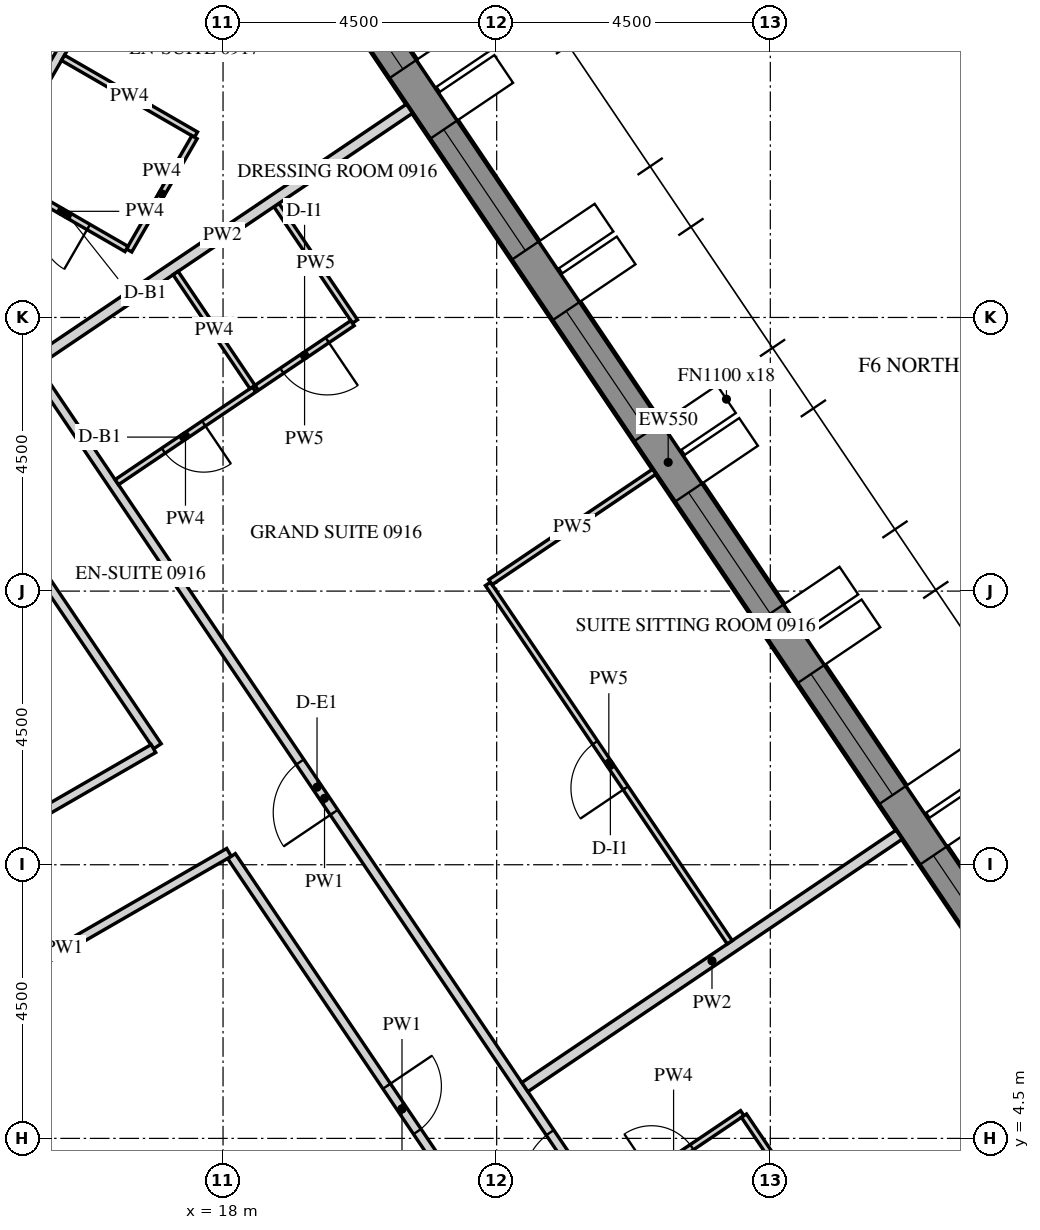
"""IFC4 building model, lengths in metres.
Left out: names, types, materials, properties, quantities, classifications, styles, units other than length and angle.
Written with IfcOpenShell. Run it as: python <this file> out.ifc"""

import sys

from ifc_helpers import new_model, si_unit, direction, frame, frame_2d, origin, place, context, subcontext, project, spatial, polyline, rectangle, outline, extrude, element, fill, save


model = new_model("IFC4")
c1 = context("Model", 3, precision=1e-05, world=origin(), true_north=direction((0.0, 1.0)))
c2 = subcontext(c1, "Body", "Model", "MODEL_VIEW")
j1 = project(units=[si_unit("LENGTHUNIT", "METRE"), si_unit("PLANEANGLEUNIT", "RADIAN")], contexts=[c1])
p1 = place(None, origin())
s1 = spatial("IfcSite", under=j1, at=p1, CompositionType="ELEMENT")
p2 = place(p1, origin())
s2 = spatial("IfcBuilding", under=s1, at=p2, CompositionType="ELEMENT")
p3 = place(p2, frame((0.0, 0.0, 123.3)))
s3 = spatial("IfcBuildingStorey", under=s2, at=p3, CompositionType="ELEMENT", Elevation=123.3)
p4 = place(p3, frame((33.728, 3.153, -0.15), z_axis=(0.0, 0.0, 1.0), x_axis=(-0.559192411416, 0.82903790445, 0.0)))
e1 = element("IfcWall", 1, at=p4, inside=s3, PredefinedType="SOLIDWALL", context=c2, shape_type="SweptSolid", body=[
    extrude(outline(polyline([(-0.026, -0.275), (30.093, -0.275), (30.048, 0.275), (0.026, 0.275), (-0.026, -0.275)])), origin(), (0.0, 0.0, 1.0), 3.9),
])
p5 = place(p4, frame((1.236, 0.0, 1.05)))
e2 = element("IfcOpeningElement", 2, at=p5, cuts=e1, PredefinedType="OPENING", context=c2, shape_type="SweptSolid", body=[
    extrude(rectangle(XDim=2.4, YDim=2.4, at=frame_2d((1.2, 1.2))), frame((0.0, 0.285, 0.0), z_axis=(0.0, -1.0, 0.0), x_axis=(1.0, 0.0, 0.0)), (0.0, 0.0, 1.0), 0.57),
])
p6 = place(p4, frame((4.835, 0.0, 1.05)))
e3 = element("IfcOpeningElement", 3, at=p6, cuts=e1, PredefinedType="OPENING", context=c2, shape_type="SweptSolid", body=[
    extrude(rectangle(XDim=2.4, YDim=2.4, at=frame_2d((1.2, 1.2))), frame((0.0, 0.285, 0.0), z_axis=(0.0, -1.0, 0.0), x_axis=(1.0, 0.0, 0.0)), (0.0, 0.0, 1.0), 0.57),
])
p7 = place(p4, frame((8.436, 0.0, 1.05)))
e4 = element("IfcOpeningElement", 4, at=p7, cuts=e1, PredefinedType="OPENING", context=c2, shape_type="SweptSolid", body=[
    extrude(rectangle(XDim=2.4, YDim=2.4, at=frame_2d((1.2, 1.2))), frame((0.0, 0.285, 0.0), z_axis=(0.0, -1.0, 0.0), x_axis=(1.0, 0.0, 0.0)), (0.0, 0.0, 1.0), 0.57),
])
p8 = place(p4, frame((12.035, 0.0, 1.05)))
e5 = element("IfcOpeningElement", 5, at=p8, cuts=e1, PredefinedType="OPENING", context=c2, shape_type="SweptSolid", body=[
    extrude(rectangle(XDim=2.4, YDim=2.4, at=frame_2d((1.2, 1.2))), frame((0.0, 0.285, 0.0), z_axis=(0.0, -1.0, 0.0), x_axis=(1.0, 0.0, 0.0)), (0.0, 0.0, 1.0), 0.57),
])
p9 = place(p4, frame((15.635, 0.0, 1.05)))
e6 = element("IfcOpeningElement", 6, at=p9, cuts=e1, PredefinedType="OPENING", context=c2, shape_type="SweptSolid", body=[
    extrude(rectangle(XDim=2.4, YDim=2.4, at=frame_2d((1.2, 1.2))), frame((0.0, 0.285, 0.0), z_axis=(0.0, -1.0, 0.0), x_axis=(1.0, 0.0, 0.0)), (0.0, 0.0, 1.0), 0.57),
])
p10 = place(p4, frame((19.236, 0.0, 1.05)))
e7 = element("IfcOpeningElement", 7, at=p10, cuts=e1, PredefinedType="OPENING", context=c2, shape_type="SweptSolid", body=[
    extrude(rectangle(XDim=2.4, YDim=2.4, at=frame_2d((1.2, 1.2))), frame((0.0, 0.285, 0.0), z_axis=(0.0, -1.0, 0.0), x_axis=(1.0, 0.0, 0.0)), (0.0, 0.0, 1.0), 0.57),
])
p11 = place(p4, frame((22.835, 0.0, 1.05)))
e8 = element("IfcOpeningElement", 8, at=p11, cuts=e1, PredefinedType="OPENING", context=c2, shape_type="SweptSolid", body=[
    extrude(rectangle(XDim=2.4, YDim=2.4, at=frame_2d((1.2, 1.2))), frame((0.0, 0.285, 0.0), z_axis=(0.0, -1.0, 0.0), x_axis=(1.0, 0.0, 0.0)), (0.0, 0.0, 1.0), 0.57),
])
p12 = place(p4, frame((26.436, 0.0, 1.05)))
e9 = element("IfcOpeningElement", 9, at=p12, cuts=e1, PredefinedType="OPENING", context=c2, shape_type="SweptSolid", body=[
    extrude(rectangle(XDim=2.4, YDim=2.4, at=frame_2d((1.2, 1.2))), frame((0.0, 0.285, 0.0), z_axis=(0.0, -1.0, 0.0), x_axis=(1.0, 0.0, 0.0)), (0.0, 0.0, 1.0), 0.57),
])
p13 = place(p3, frame((15.819, 0.0, -0.15), z_axis=(0.0, 0.0, 1.0), x_axis=(-0.499999880136, 0.866025472988, 0.0)))
e10 = element("IfcWall", 10, at=p13, inside=s3, PredefinedType="SHEAR", context=c2, shape_type="SweptSolid", body=[
    extrude(outline(polyline([(-0.173, -0.3), (15.993, -0.3), (15.646, 0.3), (0.173, 0.3), (-0.173, -0.3)])), origin(), (0.0, 0.0, 1.0), 3.9),
])
p14 = place(p13, frame((6.981, 0.0, 0.15)))
e11 = element("IfcOpeningElement", 11, at=p14, cuts=e10, PredefinedType="OPENING", context=c2, shape_type="SweptSolid", body=[
    extrude(rectangle(XDim=1.8, YDim=2.4, at=frame_2d((0.9, 1.2))), frame((0.0, 0.31, 0.0), z_axis=(0.0, -1.0, 0.0), x_axis=(1.0, 0.0, 0.0)), (0.0, 0.0, 1.0), 0.62),
])
p15 = place(p3, frame((8.083, 14.0, -0.15), z_axis=(0.0, 0.0, 1.0), x_axis=(0.499997680643, 0.866026742862, 0.0)))
e12 = element("IfcWall", 12, at=p15, inside=s3, PredefinedType="SHEAR", context=c2, shape_type="SweptSolid", body=[
    extrude(rectangle(XDim=16.509, YDim=0.6, at=frame_2d((8.254, 0.0))), origin(), (0.0, 0.0, 1.0), 3.9),
])
p16 = place(p15, frame((7.354, 0.0, 0.15)))
e13 = element("IfcOpeningElement", 13, at=p16, cuts=e12, PredefinedType="OPENING", context=c2, shape_type="SweptSolid", body=[
    extrude(rectangle(XDim=1.8, YDim=2.4, at=frame_2d((0.9, 1.2))), frame((0.0, 0.31, 0.0), z_axis=(0.0, -1.0, 0.0), x_axis=(1.0, 0.0, 0.0)), (0.0, 0.0, 1.0), 0.62),
])
p17 = place(p3, frame((25.821, 0.972, 0.0), z_axis=(0.0, 0.0, 1.0), x_axis=(-0.559193816298, 0.829036956845, 0.0)))
e14 = element("IfcWall", 14, at=p17, inside=s3, PredefinedType="PARTITIONING", context=c2, shape_type="SweptSolid", body=[
    extrude(rectangle(XDim=22.002, YDim=0.15, at=frame_2d((11.001, 0.0))), origin(), (0.0, 0.0, 1.0), 2.988),
])
p18 = place(p17, frame((3.369, 0.0, 0.0)))
e15 = element("IfcOpeningElement", 15, at=p18, cuts=e14, PredefinedType="OPENING", context=c2, shape_type="SweptSolid", body=[
    extrude(rectangle(XDim=1.0, YDim=2.1, at=frame_2d((0.5, 1.05))), frame((0.0, 0.085, 0.0), z_axis=(0.0, -1.0, 0.0), x_axis=(1.0, 0.0, 0.0)), (0.0, 0.0, 1.0), 0.17),
])
p19 = place(p17, frame((10.721, 0.0, 0.0)))
e16 = element("IfcOpeningElement", 16, at=p19, cuts=e14, PredefinedType="OPENING", context=c2, shape_type="SweptSolid", body=[
    extrude(rectangle(XDim=1.0, YDim=2.1, at=frame_2d((0.5, 1.05))), frame((0.0, 0.085, 0.0), z_axis=(0.0, -1.0, 0.0), x_axis=(1.0, 0.0, 0.0)), (0.0, 0.0, 1.0), 0.17),
])
p20 = place(p17, frame((20.852, 0.0, 0.0)))
e17 = element("IfcOpeningElement", 17, at=p20, cuts=e14, PredefinedType="OPENING", context=c2, shape_type="SweptSolid", body=[
    extrude(rectangle(XDim=1.0, YDim=2.1, at=frame_2d((0.5, 1.05))), frame((0.0, 0.085, 0.0), z_axis=(0.0, -1.0, 0.0), x_axis=(1.0, 0.0, 0.0)), (0.0, 0.0, 1.0), 0.17),
])
p21 = place(p3, frame((13.559, 19.285, 0.0), z_axis=(0.0, 0.0, 1.0), x_axis=(0.499975646431, 0.866039463868, 0.0)))
e18 = element("IfcWall", 18, at=p21, inside=s3, PredefinedType="PARTITIONING", context=c2, shape_type="SweptSolid", body=[
    extrude(rectangle(XDim=3.84, YDim=0.15, at=frame_2d((1.92, 0.0))), origin(), (0.0, 0.0, 1.0), 2.988),
])
p22 = place(p3, frame((12.664, 6.066, 0.0), z_axis=(0.0, 0.0, 1.0), x_axis=(0.866036561919, 0.499980673046, 0.0)))
e19 = element("IfcWall", 19, at=p22, inside=s3, PredefinedType="PARTITIONING", context=c2, shape_type="SweptSolid", body=[
    extrude(rectangle(XDim=6.275, YDim=0.15, at=frame_2d((3.137, 0.0))), origin(), (0.0, 0.0, 1.0), 2.988),
])
p23 = place(p3, frame((18.14, 9.141, 0.0), z_axis=(0.0, 0.0, 1.0), x_axis=(0.55918799196, -0.829040885389, 0.0)))
e20 = element("IfcWall", 20, at=p23, inside=s3, PredefinedType="PARTITIONING", context=c2, shape_type="SweptSolid", body=[
    extrude(rectangle(XDim=10.025, YDim=0.15, at=frame_2d((5.013, 0.0))), origin(), (0.0, 0.0, 1.0), 2.988),
])
p24 = place(p23, frame((4.563, 0.0, 0.0)))
e21 = element("IfcOpeningElement", 21, at=p24, cuts=e20, PredefinedType="OPENING", context=c2, shape_type="SweptSolid", body=[
    extrude(rectangle(XDim=0.9, YDim=2.1, at=frame_2d((0.45, 1.05))), frame((0.0, 0.085, 0.0), z_axis=(0.0, -1.0, 0.0), x_axis=(1.0, 0.0, 0.0)), (0.0, 0.0, 1.0), 0.17),
])
p25 = place(p3, frame((11.465, 19.037, 0.0), z_axis=(0.0, 0.0, 1.0), x_axis=(0.559196064773, -0.829035440221, 0.0)))
e22 = element("IfcWall", 22, at=p25, inside=s3, PredefinedType="PARTITIONING", context=c2, shape_type="SweptSolid", body=[
    extrude(rectangle(XDim=9.757, YDim=0.15, at=frame_2d((4.878, 0.0))), origin(), (0.0, 0.0, 1.0), 2.988),
])
p26 = place(p25, frame((4.428, 0.0, 0.0)))
e23 = element("IfcOpeningElement", 23, at=p26, cuts=e22, PredefinedType="OPENING", context=c2, shape_type="SweptSolid", body=[
    extrude(rectangle(XDim=0.9, YDim=2.1, at=frame_2d((0.45, 1.05))), frame((0.0, 0.085, 0.0), z_axis=(0.0, -1.0, 0.0), x_axis=(1.0, 0.0, 0.0)), (0.0, 0.0, 1.0), 0.17),
])
p27 = place(p3, frame((16.855, 10.911, 0.0), z_axis=(0.0, 0.0, 1.0), x_axis=(-0.866020343444, -0.500008764664, 0.0)))
e24 = element("IfcWall", 24, at=p27, inside=s3, PredefinedType="PARTITIONING", context=c2, shape_type="SweptSolid", body=[
    extrude(rectangle(XDim=6.053, YDim=0.15, at=frame_2d((3.026, 0.0))), origin(), (0.0, 0.0, 1.0), 2.988),
])
p28 = place(p3, frame((24.28, 3.391, 0.0), z_axis=(0.0, 0.0, 1.0), x_axis=(0.829005477618, 0.559240483226, 0.0)))
e25 = element("IfcWall", 25, at=p28, inside=s3, PredefinedType="PARTITIONING", context=c2, shape_type="SweptSolid", body=[
    extrude(rectangle(XDim=2.725, YDim=0.1, at=frame_2d((1.363, 0.0))), origin(), (0.0, 0.0, 1.0), 2.988),
])
p29 = place(p28, frame((0.925, 0.0, 0.0)))
e26 = element("IfcOpeningElement", 26, at=p29, cuts=e25, PredefinedType="OPENING", context=c2, shape_type="SweptSolid", body=[
    extrude(rectangle(XDim=0.8, YDim=2.1, at=frame_2d((0.4, 1.05))), frame((0.0, 0.06, 0.0), z_axis=(0.0, -1.0, 0.0), x_axis=(1.0, 0.0, 0.0)), (0.0, 0.0, 1.0), 0.12),
])
p30 = place(p3, frame((26.567, 4.873, 0.0), z_axis=(0.0, 0.0, 1.0), x_axis=(0.559155442782, -0.829062838878, 0.0)))
e27 = element("IfcWall", 27, at=p30, inside=s3, PredefinedType="PARTITIONING", context=c2, shape_type="SweptSolid", body=[
    extrude(rectangle(XDim=2.55, YDim=0.1, at=frame_2d((1.275, 0.0))), origin(), (0.0, 0.0, 1.0), 2.988),
])
p31 = place(p3, frame((29.119, 9.495, 0.0), z_axis=(0.0, 0.0, 1.0), x_axis=(-0.829038452737, -0.559191598545, 0.0)))
e28 = element("IfcWall", 28, at=p31, inside=s3, PredefinedType="PARTITIONING", context=c2, shape_type="SweptSolid", body=[
    extrude(rectangle(XDim=7.425, YDim=0.18, at=frame_2d((3.713, 0.0))), origin(), (0.0, 0.0, 1.0), 2.988),
])
p32 = place(p3, frame((18.512, 16.815, 0.0), z_axis=(0.0, 0.0, 1.0), x_axis=(-0.829005477618, -0.559240483226, 0.0)))
e29 = element("IfcWall", 29, at=p32, inside=s3, PredefinedType="PARTITIONING", context=c2, shape_type="SweptSolid", body=[
    extrude(rectangle(XDim=2.725, YDim=0.1, at=frame_2d((1.363, 0.0))), origin(), (0.0, 0.0, 1.0), 2.988),
])
p33 = place(p32, frame((1.0, 0.0, 0.0)))
e30 = element("IfcOpeningElement", 30, at=p33, cuts=e29, PredefinedType="OPENING", context=c2, shape_type="SweptSolid", body=[
    extrude(rectangle(XDim=0.8, YDim=2.1, at=frame_2d((0.4, 1.05))), frame((0.0, 0.06, 0.0), z_axis=(0.0, -1.0, 0.0), x_axis=(1.0, 0.0, 0.0)), (0.0, 0.0, 1.0), 0.12),
])
p34 = place(p3, frame((18.878, 19.849, 0.0), z_axis=(0.0, 0.0, 1.0), x_axis=(0.559204176839, -0.829029968461, 0.0)))
e31 = element("IfcWall", 31, at=p34, inside=s3, PredefinedType="PARTITIONING", context=c2, shape_type="SweptSolid", body=[
    extrude(rectangle(XDim=2.31, YDim=0.1, at=frame_2d((1.155, 0.0))), origin(), (0.0, 0.0, 1.0), 2.988),
])
p35 = place(p3, frame((20.128, 17.906, 0.0), z_axis=(0.0, 0.0, 1.0), x_axis=(-0.82903334026, -0.559199178055, 0.0)))
e32 = element("IfcWall", 32, at=p35, inside=s3, PredefinedType="PARTITIONING", context=c2, shape_type="SweptSolid", body=[
    extrude(rectangle(XDim=1.9, YDim=0.1, at=frame_2d((0.95, 0.0))), origin(), (0.0, 0.0, 1.0), 2.988),
])
p36 = place(p35, frame((0.5, 0.0, 0.0)))
e33 = element("IfcOpeningElement", 33, at=p36, cuts=e32, PredefinedType="OPENING", context=c2, shape_type="SweptSolid", body=[
    extrude(rectangle(XDim=0.9, YDim=2.1, at=frame_2d((0.45, 1.05))), frame((0.0, 0.06, 0.0), z_axis=(0.0, -1.0, 0.0), x_axis=(1.0, 0.0, 0.0)), (0.0, 0.0, 1.0), 0.12),
])
p37 = place(p3, frame((26.333, 7.724, 0.0), z_axis=(0.0, 0.0, 1.0), x_axis=(-0.559185029686, 0.829042883435, 0.0)))
e34 = element("IfcWall", 34, at=p37, inside=s3, PredefinedType="PARTITIONING", context=c2, shape_type="SweptSolid", body=[
    extrude(rectangle(XDim=7.11, YDim=0.1, at=frame_2d((3.555, 0.0))), origin(), (0.0, 0.0, 1.0), 2.988),
])
p38 = place(p37, frame((3.06, 0.0, 0.0)))
e35 = element("IfcOpeningElement", 35, at=p38, cuts=e34, PredefinedType="OPENING", context=c2, shape_type="SweptSolid", body=[
    extrude(rectangle(XDim=0.9, YDim=2.1, at=frame_2d((0.45, 1.05))), frame((0.0, 0.06, 0.0), z_axis=(0.0, -1.0, 0.0), x_axis=(1.0, 0.0, 0.0)), (0.0, 0.0, 1.0), 0.12),
])
p39 = place(p3, frame((22.398, 13.647, 0.0), z_axis=(0.0, 0.0, 1.0), x_axis=(0.829033253898, 0.55919930609, 0.0)))
e36 = element("IfcWall", 36, at=p39, inside=s3, PredefinedType="PARTITIONING", context=c2, shape_type="SweptSolid", body=[
    extrude(rectangle(XDim=3.25, YDim=0.1, at=frame_2d((1.625, 0.0))), origin(), (0.0, 0.0, 1.0), 2.988),
])
p40 = place(p3, frame((21.066, 21.433, 0.0), z_axis=(0.0, 0.0, 1.0), x_axis=(-0.829028170871, -0.559206841788, 0.0)))
e37 = element("IfcWall", 37, at=p40, inside=s3, PredefinedType="PARTITIONING", context=c2, shape_type="SweptSolid", body=[
    extrude(rectangle(XDim=7.425, YDim=0.18, at=frame_2d((3.712, 0.0))), origin(), (0.0, 0.0, 1.0), 2.988),
])
p41 = place(p3, frame((18.484, 16.857, 0.0), z_axis=(0.0, 0.0, 1.0), x_axis=(-0.559203826655, 0.82903020467, 0.0)))
e38 = element("IfcWall", 38, at=p41, inside=s3, PredefinedType="PARTITIONING", context=c2, shape_type="SweptSolid", body=[
    extrude(rectangle(XDim=2.26, YDim=0.1, at=frame_2d((1.13, 0.0))), origin(), (0.0, 0.0, 1.0), 2.988),
])
p42 = place(p3, frame((15.369, 22.27, 0.0), z_axis=(0.0, 0.0, 1.0), x_axis=(0.866039067339, -0.499976333282, 0.0)))
e39 = element("IfcWall", 39, at=p42, inside=s3, PredefinedType="PARTITIONING", context=c2, shape_type="SweptSolid", body=[
    extrude(rectangle(XDim=2.525, YDim=0.1, at=frame_2d((1.262, 0.0))), origin(), (0.0, 0.0, 1.0), 2.988),
])
p43 = place(p3, frame((17.531, 20.964, 0.0), z_axis=(0.0, 0.0, 1.0), x_axis=(-0.500010803666, -0.866019166195, 0.0)))
e40 = element("IfcWall", 40, at=p43, inside=s3, PredefinedType="PARTITIONING", context=c2, shape_type="SweptSolid", body=[
    extrude(rectangle(XDim=2.15, YDim=0.1, at=frame_2d((1.075, 0.0))), origin(), (0.0, 0.0, 1.0), 2.988),
])
p44 = place(p3, frame((16.412, 19.127, 0.0), z_axis=(0.0, 0.0, 1.0), x_axis=(-0.866006523861, 0.500032699561, 0.0)))
e41 = element("IfcWall", 41, at=p44, inside=s3, PredefinedType="PARTITIONING", context=c2, shape_type="SweptSolid", body=[
    extrude(rectangle(XDim=2.475, YDim=0.1, at=frame_2d((1.237, 0.0))), origin(), (0.0, 0.0, 1.0), 2.988),
])
p45 = place(p44, frame((0.72, 0.0, 0.0)))
e42 = element("IfcOpeningElement", 42, at=p45, cuts=e41, PredefinedType="OPENING", context=c2, shape_type="SweptSolid", body=[
    extrude(rectangle(XDim=0.8, YDim=2.1, at=frame_2d((0.4, 1.05))), frame((0.0, 0.06, 0.0), z_axis=(0.0, -1.0, 0.0), x_axis=(1.0, 0.0, 0.0)), (0.0, 0.0, 1.0), 0.12),
])
p46 = place(p6, frame((0.0, 0.205, 0.0)))
e43 = element("IfcWindow", 43, at=p46, inside=s3, PartitioningType="DOUBLE_PANEL_VERTICAL", PredefinedType="WINDOW", context=c2, shape_type="SweptSolid", body=[
    extrude(rectangle(XDim=2.4, YDim=2.4, at=frame_2d((1.2, 1.2))), frame((0.0, 0.03, 0.0), z_axis=(0.0, -1.0, 0.0), x_axis=(1.0, 0.0, 0.0)), (0.0, 0.0, 1.0), 0.06),
])
fill(e3, e43)
p47 = place(p7, frame((0.0, 0.205, 0.0)))
e44 = element("IfcWindow", 44, at=p47, inside=s3, PartitioningType="DOUBLE_PANEL_VERTICAL", PredefinedType="WINDOW", context=c2, shape_type="SweptSolid", body=[
    extrude(rectangle(XDim=2.4, YDim=2.4, at=frame_2d((1.2, 1.2))), frame((0.0, 0.03, 0.0), z_axis=(0.0, -1.0, 0.0), x_axis=(1.0, 0.0, 0.0)), (0.0, 0.0, 1.0), 0.06),
])
fill(e4, e44)
p48 = place(p8, frame((0.0, 0.205, 0.0)))
e45 = element("IfcWindow", 45, at=p48, inside=s3, PartitioningType="DOUBLE_PANEL_VERTICAL", PredefinedType="WINDOW", context=c2, shape_type="SweptSolid", body=[
    extrude(rectangle(XDim=2.4, YDim=2.4, at=frame_2d((1.2, 1.2))), frame((0.0, 0.03, 0.0), z_axis=(0.0, -1.0, 0.0), x_axis=(1.0, 0.0, 0.0)), (0.0, 0.0, 1.0), 0.06),
])
fill(e5, e45)
p49 = place(p9, frame((0.0, 0.205, 0.0)))
e46 = element("IfcWindow", 46, at=p49, inside=s3, PartitioningType="DOUBLE_PANEL_VERTICAL", PredefinedType="WINDOW", context=c2, shape_type="SweptSolid", body=[
    extrude(rectangle(XDim=2.4, YDim=2.4, at=frame_2d((1.2, 1.2))), frame((0.0, 0.03, 0.0), z_axis=(0.0, -1.0, 0.0), x_axis=(1.0, 0.0, 0.0)), (0.0, 0.0, 1.0), 0.06),
])
fill(e6, e46)
p50 = place(p10, frame((0.0, 0.205, 0.0)))
e47 = element("IfcWindow", 47, at=p50, inside=s3, PartitioningType="DOUBLE_PANEL_VERTICAL", PredefinedType="WINDOW", context=c2, shape_type="SweptSolid", body=[
    extrude(rectangle(XDim=2.4, YDim=2.4, at=frame_2d((1.2, 1.2))), frame((0.0, 0.03, 0.0), z_axis=(0.0, -1.0, 0.0), x_axis=(1.0, 0.0, 0.0)), (0.0, 0.0, 1.0), 0.06),
])
fill(e7, e47)
p51 = place(p11, frame((0.0, 0.205, 0.0)))
e48 = element("IfcWindow", 48, at=p51, inside=s3, PartitioningType="DOUBLE_PANEL_VERTICAL", PredefinedType="WINDOW", context=c2, shape_type="SweptSolid", body=[
    extrude(rectangle(XDim=2.4, YDim=2.4, at=frame_2d((1.2, 1.2))), frame((0.0, 0.03, 0.0), z_axis=(0.0, -1.0, 0.0), x_axis=(1.0, 0.0, 0.0)), (0.0, 0.0, 1.0), 0.06),
])
fill(e8, e48)
p52 = place(p18, origin())
e49 = element("IfcDoor", 49, at=p52, inside=s3, OperationType="SINGLE_SWING_LEFT", PredefinedType="DOOR", context=c2, shape_type="SweptSolid", body=[
    extrude(rectangle(XDim=1.0, YDim=2.1, at=frame_2d((0.5, 1.05))), frame((0.0, 0.025, 0.0), z_axis=(0.0, -1.0, 0.0), x_axis=(1.0, 0.0, 0.0)), (0.0, 0.0, 1.0), 0.05),
])
fill(e15, e49)
p53 = place(p29, origin())
e50 = element("IfcDoor", 50, at=p53, inside=s3, OperationType="SINGLE_SWING_RIGHT", PredefinedType="DOOR", context=c2, shape_type="SweptSolid", body=[
    extrude(rectangle(XDim=0.8, YDim=2.1, at=frame_2d((0.4, 1.05))), frame((0.0, 0.025, 0.0), z_axis=(0.0, -1.0, 0.0), x_axis=(1.0, 0.0, 0.0)), (0.0, 0.0, 1.0), 0.05),
])
fill(e26, e50)
p54 = place(p19, origin())
e51 = element("IfcDoor", 51, at=p54, inside=s3, OperationType="SINGLE_SWING_RIGHT", PredefinedType="DOOR", context=c2, shape_type="SweptSolid", body=[
    extrude(rectangle(XDim=1.0, YDim=2.1, at=frame_2d((0.5, 1.05))), frame((0.0, 0.025, 0.0), z_axis=(0.0, -1.0, 0.0), x_axis=(1.0, 0.0, 0.0)), (0.0, 0.0, 1.0), 0.05),
])
fill(e16, e51)
p55 = place(p33, origin())
e52 = element("IfcDoor", 52, at=p55, inside=s3, OperationType="SINGLE_SWING_LEFT", PredefinedType="DOOR", context=c2, shape_type="SweptSolid", body=[
    extrude(rectangle(XDim=0.8, YDim=2.1, at=frame_2d((0.4, 1.05))), frame((0.0, 0.025, 0.0), z_axis=(0.0, -1.0, 0.0), x_axis=(1.0, 0.0, 0.0)), (0.0, 0.0, 1.0), 0.05),
])
fill(e30, e52)
p56 = place(p36, origin())
e53 = element("IfcDoor", 53, at=p56, inside=s3, OperationType="SINGLE_SWING_RIGHT", PredefinedType="DOOR", context=c2, shape_type="SweptSolid", body=[
    extrude(rectangle(XDim=0.9, YDim=2.1, at=frame_2d((0.45, 1.05))), frame((0.0, 0.025, 0.0), z_axis=(0.0, -1.0, 0.0), x_axis=(1.0, 0.0, 0.0)), (0.0, 0.0, 1.0), 0.05),
])
fill(e33, e53)
p57 = place(p38, origin())
e54 = element("IfcDoor", 54, at=p57, inside=s3, OperationType="SINGLE_SWING_RIGHT", PredefinedType="DOOR", context=c2, shape_type="SweptSolid", body=[
    extrude(rectangle(XDim=0.9, YDim=2.1, at=frame_2d((0.45, 1.05))), frame((0.0, 0.025, 0.0), z_axis=(0.0, -1.0, 0.0), x_axis=(1.0, 0.0, 0.0)), (0.0, 0.0, 1.0), 0.05),
])
fill(e35, e54)
p58 = place(p45, origin())
e55 = element("IfcDoor", 55, at=p58, inside=s3, OperationType="SINGLE_SWING_RIGHT", PredefinedType="DOOR", context=c2, shape_type="SweptSolid", body=[
    extrude(rectangle(XDim=0.8, YDim=2.1, at=frame_2d((0.4, 1.05))), frame((0.0, 0.025, 0.0), z_axis=(0.0, -1.0, 0.0), x_axis=(1.0, 0.0, 0.0)), (0.0, 0.0, 1.0), 0.05),
])
fill(e42, e55)
p59 = place(p24, origin())
e56 = element("IfcDoor", 56, at=p59, inside=s3, OperationType="SINGLE_SWING_RIGHT", PredefinedType="DOOR", context=c2, shape_type="SweptSolid", body=[
    extrude(rectangle(XDim=0.9, YDim=2.1, at=frame_2d((0.45, 1.05))), frame((0.0, 0.025, 0.0), z_axis=(0.0, -1.0, 0.0), x_axis=(1.0, 0.0, 0.0)), (0.0, 0.0, 1.0), 0.05),
])
fill(e21, e56)
save(model, sys.argv[1])
